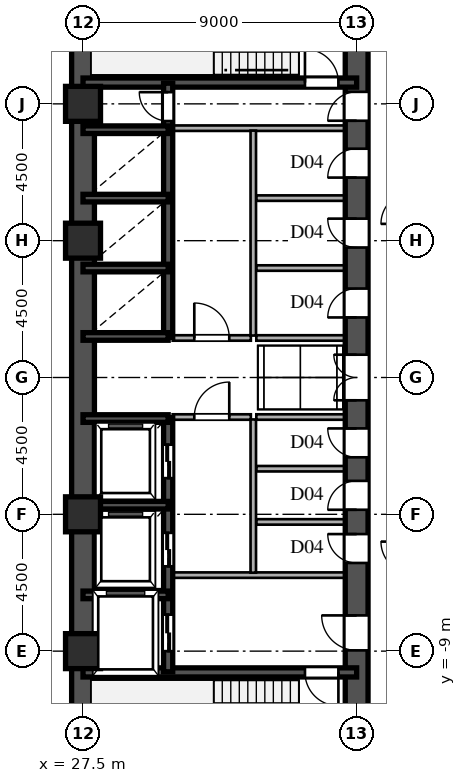
"""IFC4 building model, lengths in metres.
Left out: names, types, materials, properties, quantities, classifications, styles, units other than length and angle.
Written with IfcOpenShell. Run it as: python <this file> out.ifc"""

import sys

from ifc_helpers import new_model, si_unit, direction, frame, frame_2d, origin, origin_2d, place, context, subcontext, project, spatial, rectangle, hollow_rectangle, extrude, source, transform, mapped, element, fill, save


model = new_model("IFC4")
c1 = context("Model", 3, precision=1e-05, world=origin(), true_north=direction((0.0, 1.0)))
c2 = subcontext(c1, "Body", "Model", "MODEL_VIEW")
j1 = project(units=[si_unit("LENGTHUNIT", "METRE"), si_unit("PLANEANGLEUNIT", "RADIAN")], contexts=[c1])
p1 = place(None, origin())
s1 = spatial("IfcSite", under=j1, at=p1, CompositionType="ELEMENT")
p2 = place(p1, origin())
s2 = spatial("IfcBuilding", under=s1, at=p2, CompositionType="ELEMENT")
p3 = place(p2, frame((0.0, 0.0, 36.9)))
s3 = spatial("IfcBuildingStorey", under=s2, at=p3, CompositionType="ELEMENT", Elevation=36.9)
m1 = source(origin(), c2, "Body", "SweptSolid", [
    extrude(hollow_rectangle(XDim=1.15, YDim=1.15, WallThickness=0.048, at=origin_2d()), origin(), (0.0, 0.0, 1.0), 3.6),
])
for number, where, z_axis, x_axis in (
    (1, (27.5, -9.0, 0.0), (0.0, 0.0, 1.0), (1.0, 0.0, 0.0)),
    (2, (27.5, -4.5, 0.0), (0.0, 0.0, 1.0), (1.0, 0.0, 0.0)),
    (3, (27.5, 4.5, 0.0), (0.0, 0.0, 1.0), (1.0, 0.0, 0.0)),
    (4, (27.5, 9.0, 0.0), (0.0, 0.0, 1.0), (1.0, 0.0, 0.0)),
):
    element("IfcColumn", number, at=place(p3, frame(where, z_axis=z_axis, x_axis=x_axis)), inside=s3, PredefinedType="COLUMN", context=c2, shape_type="MappedRepresentation", body=[
        mapped(m1, transform((0.0, 0.0, 0.0), scale=1.0)),
    ])
for number, where, z_axis, x_axis in (
    (5, (27.5, -13.5, 0.0), (0.0, 0.0, 1.0), (0.0, 1.0, 0.0)),
    (6, (27.5, 1.3, 0.0), (0.0, 0.0, 1.0), (0.0, 1.0, 0.0)),
):
    element("IfcWall", number, at=place(p3, frame(where, z_axis=z_axis, x_axis=x_axis)), inside=s3, PredefinedType="SHEAR", context=c2, shape_type="SweptSolid", body=[
        extrude(rectangle(XDim=12.2, YDim=0.75, at=frame_2d((6.1, 0.0))), origin(), (0.0, 0.0, 1.0), 3.38),
    ])
p4 = place(p3, frame((27.5, -1.3, 0.0), z_axis=(0.0, 0.0, 1.0), x_axis=(0.0, 1.0, 0.0)))
e7 = element("IfcWall", 7, at=p4, inside=s3, PredefinedType="SHEAR", context=c2, shape_type="SweptSolid", body=[
    extrude(rectangle(XDim=2.6, YDim=0.75, at=frame_2d((1.3, 0.0))), origin(), (0.0, 0.0, 1.0), 3.38),
])
p5 = place(p3, frame((36.5, -13.65, 0.0), z_axis=(0.0, 0.0, 1.0), x_axis=(0.0, 1.0, 0.0)))
e8 = element("IfcWall", 8, at=p5, inside=s3, PredefinedType="SHEAR", context=c2, shape_type="SweptSolid", body=[
    extrude(rectangle(XDim=7.15, YDim=0.75, at=frame_2d((3.575, 0.0))), origin(), (0.0, 0.0, 1.0), 3.38),
])
p6 = place(p5, frame((4.675, 0.0, 0.0)))
e9 = element("IfcOpeningElement", 9, at=p6, cuts=e8, PredefinedType="OPENING", context=c2, shape_type="SweptSolid", body=[
    extrude(rectangle(XDim=1.15, YDim=2.2, at=frame_2d((0.575, 1.1))), frame((0.0, 0.385, 0.0), z_axis=(0.0, -1.0, 0.0), x_axis=(1.0, 0.0, 0.0)), (0.0, 0.0, 1.0), 0.77),
])
p7 = place(p3, frame((36.5, -1.3, 0.0), z_axis=(0.0, 0.0, 1.0), x_axis=(0.0, 1.0, 0.0)))
e10 = element("IfcWall", 10, at=p7, inside=s3, PredefinedType="SHEAR", context=c2, shape_type="SweptSolid", body=[
    extrude(rectangle(XDim=2.6, YDim=0.75, at=frame_2d((1.3, 0.0))), origin(), (0.0, 0.0, 1.0), 3.38),
])
p8 = place(p7, frame((0.55, 0.0, 0.0)))
e11 = element("IfcOpeningElement", 11, at=p8, cuts=e10, PredefinedType="OPENING", context=c2, shape_type="SweptSolid", body=[
    extrude(rectangle(XDim=1.5, YDim=2.3, at=frame_2d((0.75, 1.15))), frame((0.0, 0.385, 0.0), z_axis=(0.0, -1.0, 0.0), x_axis=(1.0, 0.0, 0.0)), (0.0, 0.0, 1.0), 0.77),
])
p9 = place(p3, frame((36.5, 8.2, 0.0), z_axis=(0.0, 0.0, 1.0), x_axis=(0.0, 1.0, 0.0)))
e12 = element("IfcWall", 12, at=p9, inside=s3, PredefinedType="SHEAR", context=c2, shape_type="SweptSolid", body=[
    extrude(rectangle(XDim=5.45, YDim=0.75, at=frame_2d((2.725, 0.0))), origin(), (0.0, 0.0, 1.0), 3.38),
])
p10 = place(p9, frame((0.245, 0.0, 0.0)))
e13 = element("IfcOpeningElement", 13, at=p10, cuts=e12, PredefinedType="OPENING", context=c2, shape_type="SweptSolid", body=[
    extrude(rectangle(XDim=0.95, YDim=2.15, at=frame_2d((0.475, 1.075))), frame((0.0, 0.385, 0.0), z_axis=(0.0, -1.0, 0.0), x_axis=(1.0, 0.0, 0.0)), (0.0, 0.0, 1.0), 0.77),
])
p11 = place(p3, frame((36.5, -6.5, 0.0), z_axis=(0.0, 0.0, 1.0), x_axis=(0.0, 1.0, 0.0)))
e14 = element("IfcWall", 14, at=p11, inside=s3, PredefinedType="SHEAR", context=c2, shape_type="SweptSolid", body=[
    extrude(rectangle(XDim=1.75, YDim=0.75, at=frame_2d((0.875, 0.0))), origin(), (0.0, 0.0, 1.0), 3.38),
])
p12 = place(p11, frame((0.4, 0.0, 0.0)))
e15 = element("IfcOpeningElement", 15, at=p12, cuts=e14, PredefinedType="OPENING", context=c2, shape_type="SweptSolid", body=[
    extrude(rectangle(XDim=0.95, YDim=2.15, at=frame_2d((0.475, 1.075))), frame((0.0, 0.385, 0.0), z_axis=(0.0, -1.0, 0.0), x_axis=(1.0, 0.0, 0.0)), (0.0, 0.0, 1.0), 0.77),
])
p13 = place(p3, frame((36.5, -4.75, 0.0), z_axis=(0.0, 0.0, 1.0), x_axis=(0.0, 1.0, 0.0)))
e16 = element("IfcWall", 16, at=p13, inside=s3, PredefinedType="SHEAR", context=c2, shape_type="SweptSolid", body=[
    extrude(rectangle(XDim=1.75, YDim=0.75, at=frame_2d((0.875, 0.0))), origin(), (0.0, 0.0, 1.0), 3.38),
])
p14 = place(p13, frame((0.4, 0.0, 0.0)))
e17 = element("IfcOpeningElement", 17, at=p14, cuts=e16, PredefinedType="OPENING", context=c2, shape_type="SweptSolid", body=[
    extrude(rectangle(XDim=0.95, YDim=2.15, at=frame_2d((0.475, 1.075))), frame((0.0, 0.385, 0.0), z_axis=(0.0, -1.0, 0.0), x_axis=(1.0, 0.0, 0.0)), (0.0, 0.0, 1.0), 0.77),
])
p15 = place(p3, frame((36.5, -3.0, 0.0), z_axis=(0.0, 0.0, 1.0), x_axis=(0.0, 1.0, 0.0)))
e18 = element("IfcWall", 18, at=p15, inside=s3, PredefinedType="SHEAR", context=c2, shape_type="SweptSolid", body=[
    extrude(rectangle(XDim=1.7, YDim=0.75, at=frame_2d((0.85, 0.0))), origin(), (0.0, 0.0, 1.0), 3.38),
])
p16 = place(p15, frame((0.375, 0.0, 0.0)))
e19 = element("IfcOpeningElement", 19, at=p16, cuts=e18, PredefinedType="OPENING", context=c2, shape_type="SweptSolid", body=[
    extrude(rectangle(XDim=0.95, YDim=2.15, at=frame_2d((0.475, 1.075))), frame((0.0, 0.385, 0.0), z_axis=(0.0, -1.0, 0.0), x_axis=(1.0, 0.0, 0.0)), (0.0, 0.0, 1.0), 0.77),
])
p17 = place(p3, frame((36.5, 1.3, 0.0), z_axis=(0.0, 0.0, 1.0), x_axis=(0.0, 1.0, 0.0)))
e20 = element("IfcWall", 20, at=p17, inside=s3, PredefinedType="SHEAR", context=c2, shape_type="SweptSolid", body=[
    extrude(rectangle(XDim=2.3, YDim=0.75, at=frame_2d((1.15, 0.0))), origin(), (0.0, 0.0, 1.0), 3.38),
])
p18 = place(p17, frame((0.675, 0.0, 0.0)))
e21 = element("IfcOpeningElement", 21, at=p18, cuts=e20, PredefinedType="OPENING", context=c2, shape_type="SweptSolid", body=[
    extrude(rectangle(XDim=0.95, YDim=2.15, at=frame_2d((0.475, 1.075))), frame((0.0, 0.385, 0.0), z_axis=(0.0, -1.0, 0.0), x_axis=(1.0, 0.0, 0.0)), (0.0, 0.0, 1.0), 0.77),
])
p19 = place(p3, frame((36.5, 3.6, 0.0), z_axis=(0.0, 0.0, 1.0), x_axis=(0.0, 1.0, 0.0)))
e22 = element("IfcWall", 22, at=p19, inside=s3, PredefinedType="SHEAR", context=c2, shape_type="SweptSolid", body=[
    extrude(rectangle(XDim=2.3, YDim=0.75, at=frame_2d((1.15, 0.0))), origin(), (0.0, 0.0, 1.0), 3.38),
])
p20 = place(p19, frame((0.675, 0.0, 0.0)))
e23 = element("IfcOpeningElement", 23, at=p20, cuts=e22, PredefinedType="OPENING", context=c2, shape_type="SweptSolid", body=[
    extrude(rectangle(XDim=0.95, YDim=2.15, at=frame_2d((0.475, 1.075))), frame((0.0, 0.385, 0.0), z_axis=(0.0, -1.0, 0.0), x_axis=(1.0, 0.0, 0.0)), (0.0, 0.0, 1.0), 0.77),
])
p21 = place(p3, frame((36.5, 5.9, 0.0), z_axis=(0.0, 0.0, 1.0), x_axis=(0.0, 1.0, 0.0)))
e24 = element("IfcWall", 24, at=p21, inside=s3, PredefinedType="SHEAR", context=c2, shape_type="SweptSolid", body=[
    extrude(rectangle(XDim=2.3, YDim=0.75, at=frame_2d((1.15, 0.0))), origin(), (0.0, 0.0, 1.0), 3.38),
])
p22 = place(p21, frame((0.675, 0.0, 0.0)))
e25 = element("IfcOpeningElement", 25, at=p22, cuts=e24, PredefinedType="OPENING", context=c2, shape_type="SweptSolid", body=[
    extrude(rectangle(XDim=0.95, YDim=2.15, at=frame_2d((0.475, 1.075))), frame((0.0, 0.385, 0.0), z_axis=(0.0, -1.0, 0.0), x_axis=(1.0, 0.0, 0.0)), (0.0, 0.0, 1.0), 0.77),
])
p23 = place(p3, frame((27.5, -9.7, 0.0), z_axis=(0.0, 0.0, 1.0), x_axis=(1.0, 0.0, 0.0)))
e26 = element("IfcWall", 26, at=p23, inside=s3, PredefinedType="SHEAR", context=c2, shape_type="SweptSolid", body=[
    extrude(rectangle(XDim=9.0, YDim=0.3, at=frame_2d((4.5, 0.0))), origin(), (0.0, 0.0, 1.0), 3.38),
])
p24 = place(p23, frame((7.3, 0.0, 0.0)))
e27 = element("IfcOpeningElement", 27, at=p24, cuts=e26, PredefinedType="OPENING", context=c2, shape_type="SweptSolid", body=[
    extrude(rectangle(XDim=1.1, YDim=2.2, at=frame_2d((0.55, 1.1))), frame((0.0, 0.16, 0.0), z_axis=(0.0, -1.0, 0.0), x_axis=(1.0, 0.0, 0.0)), (0.0, 0.0, 1.0), 0.32),
])
p25 = place(p3, frame((27.5, 9.7, 0.0), z_axis=(0.0, 0.0, 1.0), x_axis=(1.0, 0.0, 0.0)))
e28 = element("IfcWall", 28, at=p25, inside=s3, PredefinedType="SHEAR", context=c2, shape_type="SweptSolid", body=[
    extrude(rectangle(XDim=9.0, YDim=0.3, at=frame_2d((4.5, 0.0))), origin(), (0.0, 0.0, 1.0), 3.38),
])
p26 = place(p25, frame((7.3, 0.0, 0.0)))
e29 = element("IfcOpeningElement", 29, at=p26, cuts=e28, PredefinedType="OPENING", context=c2, shape_type="SweptSolid", body=[
    extrude(rectangle(XDim=1.1, YDim=2.2, at=frame_2d((0.55, 1.1))), frame((0.0, 0.16, 0.0), z_axis=(0.0, -1.0, 0.0), x_axis=(1.0, 0.0, 0.0)), (0.0, 0.0, 1.0), 0.32),
])
for number, where, z_axis, x_axis in (
    (30, (27.5, -7.15, 0.0), (0.0, 0.0, 1.0), (1.0, 0.0, 0.0)),
    (31, (27.5, -4.2, 0.0), (0.0, 0.0, 1.0), (1.0, 0.0, 0.0)),
    (32, (27.5, -1.35, 0.0), (0.0, 0.0, 1.0), (1.0, 0.0, 0.0)),
    (33, (27.5, 1.35, 0.0), (0.0, 0.0, 1.0), (1.0, 0.0, 0.0)),
    (34, (27.5, 3.6, 0.0), (0.0, 0.0, 1.0), (1.0, 0.0, 0.0)),
    (35, (27.5, 5.9, 0.0), (0.0, 0.0, 1.0), (1.0, 0.0, 0.0)),
    (36, (27.5, 8.15, 0.0), (0.0, 0.0, 1.0), (1.0, 0.0, 0.0)),
):
    element("IfcWall", number, at=place(p3, frame(where, z_axis=z_axis, x_axis=x_axis)), inside=s3, PredefinedType="SHEAR", context=c2, shape_type="SweptSolid", body=[
        extrude(rectangle(XDim=2.8, YDim=0.25, at=frame_2d((1.4, 0.0))), origin(), (0.0, 0.0, 1.0), 3.38),
    ])
p27 = place(p3, frame((30.3, -9.68, 0.0), z_axis=(0.0, 0.0, 1.0), x_axis=(0.0, 1.0, 0.0)))
e37 = element("IfcWall", 37, at=p27, inside=s3, PredefinedType="SHEAR", context=c2, shape_type="SweptSolid", body=[
    extrude(rectangle(XDim=2.56, YDim=0.3, at=frame_2d((1.28, 0.0))), origin(), (0.0, 0.0, 1.0), 3.38),
])
p28 = place(p27, frame((0.68, 0.0, 0.0)))
e38 = element("IfcOpeningElement", 38, at=p28, cuts=e37, PredefinedType="OPENING", context=c2, shape_type="SweptSolid", body=[
    extrude(rectangle(XDim=1.2, YDim=2.25, at=frame_2d((0.6, 1.125))), frame((0.0, 0.16, 0.0), z_axis=(0.0, -1.0, 0.0), x_axis=(1.0, 0.0, 0.0)), (0.0, 0.0, 1.0), 0.32),
])
p29 = place(p3, frame((30.3, -7.12, 0.0), z_axis=(0.0, 0.0, 1.0), x_axis=(0.0, 1.0, 0.0)))
e39 = element("IfcWall", 39, at=p29, inside=s3, PredefinedType="SHEAR", context=c2, shape_type="SweptSolid", body=[
    extrude(rectangle(XDim=2.92, YDim=0.3, at=frame_2d((1.46, 0.0))), origin(), (0.0, 0.0, 1.0), 3.38),
])
p30 = place(p29, frame((0.91, 0.0, 0.0)))
e40 = element("IfcOpeningElement", 40, at=p30, cuts=e39, PredefinedType="OPENING", context=c2, shape_type="SweptSolid", body=[
    extrude(rectangle(XDim=1.1, YDim=2.2, at=frame_2d((0.55, 1.1))), frame((0.0, 0.16, 0.0), z_axis=(0.0, -1.0, 0.0), x_axis=(1.0, 0.0, 0.0)), (0.0, 0.0, 1.0), 0.32),
])
p31 = place(p3, frame((30.3, -4.2, 0.0), z_axis=(0.0, 0.0, 1.0), x_axis=(0.0, 1.0, 0.0)))
e41 = element("IfcWall", 41, at=p31, inside=s3, PredefinedType="SHEAR", context=c2, shape_type="SweptSolid", body=[
    extrude(rectangle(XDim=2.88, YDim=0.3, at=frame_2d((1.44, 0.0))), origin(), (0.0, 0.0, 1.0), 3.38),
])
p32 = place(p31, frame((0.89, 0.0, 0.0)))
e42 = element("IfcOpeningElement", 42, at=p32, cuts=e41, PredefinedType="OPENING", context=c2, shape_type="SweptSolid", body=[
    extrude(rectangle(XDim=1.1, YDim=2.2, at=frame_2d((0.55, 1.1))), frame((0.0, 0.16, 0.0), z_axis=(0.0, -1.0, 0.0), x_axis=(1.0, 0.0, 0.0)), (0.0, 0.0, 1.0), 0.32),
])
p33 = place(p3, frame((30.3, 1.32, 0.0), z_axis=(0.0, 0.0, 1.0), x_axis=(0.0, 1.0, 0.0)))
e43 = element("IfcWall", 43, at=p33, inside=s3, PredefinedType="SHEAR", context=c2, shape_type="SweptSolid", body=[
    extrude(rectangle(XDim=2.28, YDim=0.3, at=frame_2d((1.14, 0.0))), origin(), (0.0, 0.0, 1.0), 3.38),
])
p34 = place(p3, frame((30.3, 3.6, 0.0), z_axis=(0.0, 0.0, 1.0), x_axis=(0.0, 1.0, 0.0)))
e44 = element("IfcWall", 44, at=p34, inside=s3, PredefinedType="SHEAR", context=c2, shape_type="SweptSolid", body=[
    extrude(rectangle(XDim=2.3, YDim=0.3, at=frame_2d((1.15, 0.0))), origin(), (0.0, 0.0, 1.0), 3.38),
])
p35 = place(p3, frame((30.3, 5.9, 0.0), z_axis=(0.0, 0.0, 1.0), x_axis=(0.0, 1.0, 0.0)))
e45 = element("IfcWall", 45, at=p35, inside=s3, PredefinedType="SHEAR", context=c2, shape_type="SweptSolid", body=[
    extrude(rectangle(XDim=2.25, YDim=0.3, at=frame_2d((1.125, 0.0))), origin(), (0.0, 0.0, 1.0), 3.38),
])
p36 = place(p3, frame((30.3, 8.15, 0.0), z_axis=(0.0, 0.0, 1.0), x_axis=(0.0, 1.0, 0.0)))
e46 = element("IfcWall", 46, at=p36, inside=s3, PredefinedType="SHEAR", context=c2, shape_type="SweptSolid", body=[
    extrude(rectangle(XDim=1.53, YDim=0.3, at=frame_2d((0.765, 0.0))), origin(), (0.0, 0.0, 1.0), 3.38),
])
p37 = place(p36, frame((0.285, 0.0, 0.0)))
e47 = element("IfcOpeningElement", 47, at=p37, cuts=e46, PredefinedType="OPENING", context=c2, shape_type="SweptSolid", body=[
    extrude(rectangle(XDim=0.95, YDim=2.15, at=frame_2d((0.475, 1.075))), frame((0.0, 0.16, 0.0), z_axis=(0.0, -1.0, 0.0), x_axis=(1.0, 0.0, 0.0)), (0.0, 0.0, 1.0), 0.32),
])
for number, where, z_axis, x_axis in (
    (48, (30.45, -6.5, 0.0), (0.0, 0.0, 1.0), (1.0, 0.0, 0.0)),
    (49, (30.45, 8.2, 0.0), (0.0, 0.0, 1.0), (1.0, 0.0, 0.0)),
):
    element("IfcWall", number, at=place(p3, frame(where, z_axis=z_axis, x_axis=x_axis)), inside=s3, PredefinedType="PARTITIONING", context=c2, shape_type="SweptSolid", body=[
        extrude(rectangle(XDim=5.7, YDim=0.18, at=frame_2d((2.85, 0.0))), origin(), (0.0, 0.0, 1.0), 3.38),
    ])
p38 = place(p3, frame((33.1, -6.42, 0.0), z_axis=(0.0, 0.0, 1.0), x_axis=(0.0, 1.0, 0.0)))
e50 = element("IfcWall", 50, at=p38, inside=s3, PredefinedType="PARTITIONING", context=c2, shape_type="SweptSolid", body=[
    extrude(rectangle(XDim=5.04, YDim=0.18, at=frame_2d((2.52, 0.0))), origin(), (0.0, 0.0, 1.0), 3.38),
])
p39 = place(p3, frame((33.1, 1.38, 0.0), z_axis=(0.0, 0.0, 1.0), x_axis=(0.0, 1.0, 0.0)))
e51 = element("IfcWall", 51, at=p39, inside=s3, PredefinedType="PARTITIONING", context=c2, shape_type="SweptSolid", body=[
    extrude(rectangle(XDim=6.74, YDim=0.18, at=frame_2d((3.37, 0.0))), origin(), (0.0, 0.0, 1.0), 3.38),
])
p40 = place(p3, frame((30.45, -1.3, 0.0), z_axis=(0.0, 0.0, 1.0), x_axis=(1.0, 0.0, 0.0)))
e52 = element("IfcWall", 52, at=p40, inside=s3, PredefinedType="PARTITIONING", context=c2, shape_type="SweptSolid", body=[
    extrude(rectangle(XDim=2.57, YDim=0.18, at=frame_2d((1.285, 0.0))), origin(), (0.0, 0.0, 1.0), 3.38),
])
p41 = place(p40, frame((0.71, 0.0, 0.0)))
e53 = element("IfcOpeningElement", 53, at=p41, cuts=e52, PredefinedType="OPENING", context=c2, shape_type="SweptSolid", body=[
    extrude(rectangle(XDim=1.15, YDim=2.2, at=frame_2d((0.575, 1.1))), frame((0.0, 0.1, 0.0), z_axis=(0.0, -1.0, 0.0), x_axis=(1.0, 0.0, 0.0)), (0.0, 0.0, 1.0), 0.2),
])
p42 = place(p3, frame((30.45, 1.3, 0.0), z_axis=(0.0, 0.0, 1.0), x_axis=(1.0, 0.0, 0.0)))
e54 = element("IfcWall", 54, at=p42, inside=s3, PredefinedType="PARTITIONING", context=c2, shape_type="SweptSolid", body=[
    extrude(rectangle(XDim=2.57, YDim=0.18, at=frame_2d((1.285, 0.0))), origin(), (0.0, 0.0, 1.0), 3.38),
])
p43 = place(p42, frame((0.71, 0.0, 0.0)))
e55 = element("IfcOpeningElement", 55, at=p43, cuts=e54, PredefinedType="OPENING", context=c2, shape_type="SweptSolid", body=[
    extrude(rectangle(XDim=1.15, YDim=2.2, at=frame_2d((0.575, 1.1))), frame((0.0, 0.1, 0.0), z_axis=(0.0, -1.0, 0.0), x_axis=(1.0, 0.0, 0.0)), (0.0, 0.0, 1.0), 0.2),
])
for number, where, z_axis, x_axis in (
    (56, (33.2, -1.3, 0.0), (0.0, 0.0, 1.0), (1.0, 0.0, 0.0)),
    (57, (33.2, 1.3, 0.0), (0.0, 0.0, 1.0), (1.0, 0.0, 0.0)),
    (58, (33.2, -4.75, 0.0), (0.0, 0.0, 1.0), (1.0, 0.0, 0.0)),
    (59, (33.2, -3.0, 0.0), (0.0, 0.0, 1.0), (1.0, 0.0, 0.0)),
    (60, (33.2, 3.6, 0.0), (0.0, 0.0, 1.0), (1.0, 0.0, 0.0)),
    (61, (33.2, 5.9, 0.0), (0.0, 0.0, 1.0), (1.0, 0.0, 0.0)),
):
    element("IfcWall", number, at=place(p3, frame(where, z_axis=z_axis, x_axis=x_axis)), inside=s3, PredefinedType="PARTITIONING", context=c2, shape_type="SweptSolid", body=[
        extrude(rectangle(XDim=2.95, YDim=0.18, at=frame_2d((1.475, 0.0))), origin(), (0.0, 0.0, 1.0), 3.38),
    ])
m2 = source(origin(), c2, "Body", "SweptSolid", [
    extrude(rectangle(XDim=1.15, YDim=2.2, at=frame_2d((0.575, 1.1))), frame((0.0, 0.025, 0.0), z_axis=(0.0, -1.0, 0.0), x_axis=(1.0, 0.0, 0.0)), (0.0, 0.0, 1.0), 0.05),
])
p44 = place(p6, origin())
e62 = element("IfcDoor", 62, at=p44, inside=s3, OperationType="SINGLE_SWING_RIGHT", PredefinedType="DOOR", context=c2, shape_type="MappedRepresentation", body=[
    mapped(m2, transform((0.0, 0.0, 0.0), scale=1.0)),
])
fill(e9, e62)
m3 = source(origin(), c2, "Body", "SweptSolid", [
    extrude(rectangle(XDim=1.5, YDim=2.3, at=frame_2d((0.75, 1.15))), frame((0.0, 0.025, 0.0), z_axis=(0.0, -1.0, 0.0), x_axis=(1.0, 0.0, 0.0)), (0.0, 0.0, 1.0), 0.05),
])
p45 = place(p8, origin())
e63 = element("IfcDoor", 63, at=p45, inside=s3, OperationType="DOUBLE_SWING_LEFT", PredefinedType="DOOR", context=c2, shape_type="MappedRepresentation", body=[
    mapped(m3, transform((0.0, 0.0, 0.0), scale=1.0)),
])
fill(e11, e63)
m4 = source(origin(), c2, "Body", "SweptSolid", [
    extrude(rectangle(XDim=0.95, YDim=2.15, at=frame_2d((0.475, 1.075))), frame((0.0, 0.025, 0.0), z_axis=(0.0, -1.0, 0.0), x_axis=(1.0, 0.0, 0.0)), (0.0, 0.0, 1.0), 0.05),
])
p46 = place(p10, origin())
e64 = element("IfcDoor", 64, at=p46, inside=s3, OperationType="SINGLE_SWING_LEFT", PredefinedType="DOOR", context=c2, shape_type="MappedRepresentation", body=[
    mapped(m4, transform((0.0, 0.0, 0.0), scale=1.0)),
])
fill(e13, e64)
p47 = place(p12, origin())
e65 = element("IfcDoor", 65, at=p47, inside=s3, OperationType="SINGLE_SWING_RIGHT", PredefinedType="DOOR", context=c2, shape_type="MappedRepresentation", body=[
    mapped(m4, transform((0.0, 0.0, 0.0), scale=1.0)),
])
fill(e15, e65)
p48 = place(p14, origin())
e66 = element("IfcDoor", 66, at=p48, inside=s3, OperationType="SINGLE_SWING_LEFT", PredefinedType="DOOR", context=c2, shape_type="MappedRepresentation", body=[
    mapped(m4, transform((0.0, 0.0, 0.0), scale=1.0)),
])
fill(e17, e66)
p49 = place(p16, origin())
e67 = element("IfcDoor", 67, at=p49, inside=s3, OperationType="SINGLE_SWING_RIGHT", PredefinedType="DOOR", context=c2, shape_type="MappedRepresentation", body=[
    mapped(m4, transform((0.0, 0.0, 0.0), scale=1.0)),
])
fill(e19, e67)
p50 = place(p18, origin())
e68 = element("IfcDoor", 68, at=p50, inside=s3, OperationType="SINGLE_SWING_LEFT", PredefinedType="DOOR", context=c2, shape_type="MappedRepresentation", body=[
    mapped(m4, transform((0.0, 0.0, 0.0), scale=1.0)),
])
fill(e21, e68)
p51 = place(p20, origin())
e69 = element("IfcDoor", 69, at=p51, inside=s3, OperationType="SINGLE_SWING_RIGHT", PredefinedType="DOOR", context=c2, shape_type="MappedRepresentation", body=[
    mapped(m4, transform((0.0, 0.0, 0.0), scale=1.0)),
])
fill(e23, e69)
p52 = place(p22, origin())
e70 = element("IfcDoor", 70, at=p52, inside=s3, OperationType="SINGLE_SWING_LEFT", PredefinedType="DOOR", context=c2, shape_type="MappedRepresentation", body=[
    mapped(m4, transform((0.0, 0.0, 0.0), scale=1.0)),
])
fill(e25, e70)
m5 = source(origin(), c2, "Body", "SweptSolid", [
    extrude(rectangle(XDim=1.1, YDim=2.2, at=frame_2d((0.55, 1.1))), frame((0.0, 0.025, 0.0), z_axis=(0.0, -1.0, 0.0), x_axis=(1.0, 0.0, 0.0)), (0.0, 0.0, 1.0), 0.05),
])
p53 = place(p24, frame((1.1, 0.0, 0.0), z_axis=(0.0, 0.0, 1.0), x_axis=(-1.0, 0.0, 0.0)))
e71 = element("IfcDoor", 71, at=p53, inside=s3, OperationType="SINGLE_SWING_RIGHT", PredefinedType="DOOR", context=c2, shape_type="MappedRepresentation", body=[
    mapped(m5, transform((0.0, 0.0, 0.0), scale=1.0)),
])
fill(e27, e71)
p54 = place(p26, origin())
e72 = element("IfcDoor", 72, at=p54, inside=s3, OperationType="SINGLE_SWING_LEFT", PredefinedType="DOOR", context=c2, shape_type="MappedRepresentation", body=[
    mapped(m5, transform((0.0, 0.0, 0.0), scale=1.0)),
])
fill(e29, e72)
m6 = source(origin(), c2, "Body", "SweptSolid", [
    extrude(rectangle(XDim=1.2, YDim=2.25, at=frame_2d((0.6, 1.125))), frame((0.0, 0.025, 0.0), z_axis=(0.0, -1.0, 0.0), x_axis=(1.0, 0.0, 0.0)), (0.0, 0.0, 1.0), 0.05),
])
p55 = place(p28, origin())
e73 = element("IfcDoor", 73, at=p55, inside=s3, OperationType="DOUBLE_DOOR_SLIDING", PredefinedType="DOOR", context=c2, shape_type="MappedRepresentation", body=[
    mapped(m6, transform((0.0, 0.0, 0.0), scale=1.0)),
])
fill(e38, e73)
m7 = source(origin(), c2, "Body", "SweptSolid", [
    extrude(rectangle(XDim=1.1, YDim=2.2, at=frame_2d((0.55, 1.1))), frame((0.0, 0.025, 0.0), z_axis=(0.0, -1.0, 0.0), x_axis=(1.0, 0.0, 0.0)), (0.0, 0.0, 1.0), 0.05),
])
p56 = place(p30, origin())
e74 = element("IfcDoor", 74, at=p56, inside=s3, OperationType="DOUBLE_DOOR_SLIDING", PredefinedType="DOOR", context=c2, shape_type="MappedRepresentation", body=[
    mapped(m7, transform((0.0, 0.0, 0.0), scale=1.0)),
])
fill(e40, e74)
p57 = place(p32, origin())
e75 = element("IfcDoor", 75, at=p57, inside=s3, OperationType="DOUBLE_DOOR_SLIDING", PredefinedType="DOOR", context=c2, shape_type="MappedRepresentation", body=[
    mapped(m7, transform((0.0, 0.0, 0.0), scale=1.0)),
])
fill(e42, e75)
p58 = place(p37, origin())
e76 = element("IfcDoor", 76, at=p58, inside=s3, OperationType="SINGLE_SWING_RIGHT", PredefinedType="DOOR", context=c2, shape_type="MappedRepresentation", body=[
    mapped(m4, transform((0.0, 0.0, 0.0), scale=1.0)),
])
fill(e47, e76)
p59 = place(p41, origin())
e77 = element("IfcDoor", 77, at=p59, inside=s3, OperationType="SINGLE_SWING_RIGHT", PredefinedType="DOOR", context=c2, shape_type="MappedRepresentation", body=[
    mapped(m2, transform((0.0, 0.0, 0.0), scale=1.0)),
])
fill(e53, e77)
p60 = place(p43, origin())
e78 = element("IfcDoor", 78, at=p60, inside=s3, OperationType="SINGLE_SWING_LEFT", PredefinedType="DOOR", context=c2, shape_type="MappedRepresentation", body=[
    mapped(m2, transform((0.0, 0.0, 0.0), scale=1.0)),
])
fill(e55, e78)
save(model, sys.argv[1])
